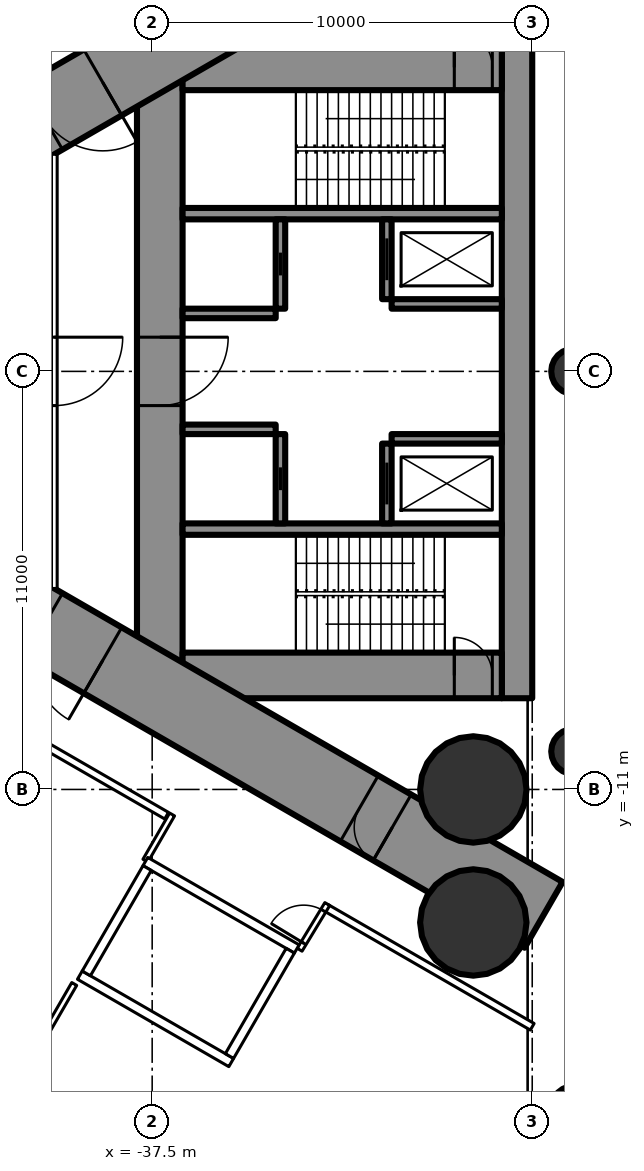
"""IFC4 building model, lengths in metres.
Left out: names, types, materials, properties, quantities, classifications, styles, units other than length and angle.
Written with IfcOpenShell. Run it as: python <this file> out.ifc"""

import sys

from ifc_helpers import new_model, si_unit, direction, frame, frame_2d, origin, origin_2d, place, context, subcontext, project, spatial, rectangle, circle, hollow_circle, extrude, element, fill, save


model = new_model("IFC4")
c1 = context("Model", 3, precision=1e-05, world=origin(), true_north=direction((0.0, 1.0)))
c2 = subcontext(c1, "Body", "Model", "MODEL_VIEW")
j1 = project(units=[si_unit("LENGTHUNIT", "METRE"), si_unit("PLANEANGLEUNIT", "RADIAN")], contexts=[c1])
p1 = place(None, origin())
s1 = spatial("IfcSite", under=j1, at=p1, CompositionType="ELEMENT")
p2 = place(p1, origin())
s2 = spatial("IfcBuilding", under=s1, at=p2, CompositionType="ELEMENT")
p3 = place(p2, frame((0.0, 0.0, 7.2)))
s3 = spatial("IfcBuildingStorey", under=s2, at=p3, CompositionType="ELEMENT", Elevation=7.2)
for number, where, z_axis, x_axis in (
    (1, (-29.05, -11.0, 0.0), (0.0, 0.0, 1.0), (1.0, 0.0, 0.0)),
    (2, (-29.05, -14.5, 0.0), (0.0, 0.0, 1.0), (1.0, 0.0, 0.0)),
):
    element("IfcColumn", number, at=place(p3, frame(where, z_axis=z_axis, x_axis=x_axis)), inside=s3, PredefinedType="COLUMN", context=c2, shape_type="SweptSolid", body=[
        extrude(hollow_circle(Radius=1.4, WallThickness=0.12, at=origin_2d()), origin(), (0.0, 0.0, 1.0), 5.4),
    ])
p4 = place(p3, frame((-27.9, 8.6, 0.0), z_axis=(0.0, 0.0, 1.0), x_axis=(0.0, -1.0, 0.0)))
e3 = element("IfcWall", 3, at=p4, inside=s3, PredefinedType="SHEAR", context=c2, shape_type="SweptSolid", body=[
    extrude(rectangle(XDim=17.2, YDim=0.8, at=frame_2d((8.6, 0.0))), origin(), (0.0, 0.0, 1.0), 5.4),
])
p5 = place(p3, frame((-37.3, 8.6, 0.0), z_axis=(0.0, 0.0, 1.0), x_axis=(0.0, -1.0, 0.0)))
e4 = element("IfcWall", 4, at=p5, inside=s3, PredefinedType="SHEAR", context=c2, shape_type="SweptSolid", body=[
    extrude(rectangle(XDim=17.2, YDim=1.2, at=frame_2d((8.6, 0.0))), origin(), (0.0, 0.0, 1.0), 5.4),
])
p6 = place(p5, frame((7.7, 0.0, 0.0)))
e5 = element("IfcOpeningElement", 5, at=p6, cuts=e4, PredefinedType="OPENING", context=c2, shape_type="SweptSolid", body=[
    extrude(rectangle(XDim=1.8, YDim=2.2, at=frame_2d((0.9, 1.1))), frame((0.0, 0.61, 0.0), z_axis=(0.0, -1.0, 0.0), x_axis=(1.0, 0.0, 0.0)), (0.0, 0.0, 1.0), 1.22),
])
p7 = place(p3, frame((-28.3, 8.0, 0.0), z_axis=(0.0, 0.0, 1.0), x_axis=(-1.0, 0.0, 0.0)))
e6 = element("IfcWall", 6, at=p7, inside=s3, PredefinedType="SHEAR", context=c2, shape_type="SweptSolid", body=[
    extrude(rectangle(XDim=8.4, YDim=1.2, at=frame_2d((4.2, 0.0))), origin(), (0.0, 0.0, 1.0), 5.4),
])
p8 = place(p7, frame((0.25, 0.0, 0.0)))
e7 = element("IfcOpeningElement", 7, at=p8, cuts=e6, PredefinedType="OPENING", context=c2, shape_type="SweptSolid", body=[
    extrude(rectangle(XDim=1.0, YDim=2.2, at=frame_2d((0.5, 1.1))), frame((0.0, 0.61, 0.0), z_axis=(0.0, -1.0, 0.0), x_axis=(1.0, 0.0, 0.0)), (0.0, 0.0, 1.0), 1.22),
])
p9 = place(p3, frame((-28.3, -8.0, 0.0), z_axis=(0.0, 0.0, 1.0), x_axis=(-1.0, 0.0, 0.0)))
e8 = element("IfcWall", 8, at=p9, inside=s3, PredefinedType="SHEAR", context=c2, shape_type="SweptSolid", body=[
    extrude(rectangle(XDim=8.4, YDim=1.2, at=frame_2d((4.2, 0.0))), origin(), (0.0, 0.0, 1.0), 5.4),
])
p10 = place(p9, frame((0.25, 0.0, 0.0)))
e9 = element("IfcOpeningElement", 9, at=p10, cuts=e8, PredefinedType="OPENING", context=c2, shape_type="SweptSolid", body=[
    extrude(rectangle(XDim=1.0, YDim=2.2, at=frame_2d((0.5, 1.1))), frame((0.0, 0.61, 0.0), z_axis=(0.0, -1.0, 0.0), x_axis=(1.0, 0.0, 0.0)), (0.0, 0.0, 1.0), 1.22),
])
for number, where, z_axis, x_axis in (
    (10, (-28.3, 4.15, 0.0), (0.0, 0.0, 1.0), (-1.0, 0.0, 0.0)),
    (11, (-28.3, -4.15, 0.0), (0.0, 0.0, 1.0), (-1.0, 0.0, 0.0)),
):
    element("IfcWall", number, at=place(p3, frame(where, z_axis=z_axis, x_axis=x_axis)), inside=s3, PredefinedType="SHEAR", context=c2, shape_type="SweptSolid", body=[
        extrude(rectangle(XDim=8.4, YDim=0.3, at=frame_2d((4.2, 0.0))), origin(), (0.0, 0.0, 1.0), 5.4),
    ])
p11 = place(p3, frame((-31.325, 4.0, 0.0), z_axis=(0.0, 0.0, 1.0), x_axis=(0.0, -1.0, 0.0)))
e12 = element("IfcWall", 12, at=p11, inside=s3, PredefinedType="SHEAR", context=c2, shape_type="SweptSolid", body=[
    extrude(rectangle(XDim=2.1, YDim=0.25, at=frame_2d((1.05, 0.0))), origin(), (0.0, 0.0, 1.0), 5.4),
])
p12 = place(p11, frame((0.5, 0.0, 0.0)))
e13 = element("IfcOpeningElement", 13, at=p12, cuts=e12, PredefinedType="OPENING", context=c2, shape_type="SweptSolid", body=[
    extrude(rectangle(XDim=1.1, YDim=2.2, at=frame_2d((0.55, 1.1))), frame((0.0, 0.135, 0.0), z_axis=(0.0, -1.0, 0.0), x_axis=(1.0, 0.0, 0.0)), (0.0, 0.0, 1.0), 0.27),
])
p13 = place(p3, frame((-34.125, 4.0, 0.0), z_axis=(0.0, 0.0, 1.0), x_axis=(0.0, -1.0, 0.0)))
e14 = element("IfcWall", 14, at=p13, inside=s3, PredefinedType="SHEAR", context=c2, shape_type="SweptSolid", body=[
    extrude(rectangle(XDim=2.35, YDim=0.25, at=frame_2d((1.175, 0.0))), origin(), (0.0, 0.0, 1.0), 5.4),
])
p14 = place(p13, frame((0.875, 0.0, 0.0)))
e15 = element("IfcOpeningElement", 15, at=p14, cuts=e14, PredefinedType="OPENING", context=c2, shape_type="SweptSolid", body=[
    extrude(rectangle(XDim=0.6, YDim=2.0, at=frame_2d((0.3, 1.0))), frame((0.0, 0.135, 0.0), z_axis=(0.0, -1.0, 0.0), x_axis=(1.0, 0.0, 0.0)), (0.0, 0.0, 1.0), 0.27),
])
p15 = place(p3, frame((-28.3, 1.775, 0.0), z_axis=(0.0, 0.0, 1.0), x_axis=(-1.0, 0.0, 0.0)))
e16 = element("IfcWall", 16, at=p15, inside=s3, PredefinedType="SHEAR", context=c2, shape_type="SweptSolid", body=[
    extrude(rectangle(XDim=2.9, YDim=0.25, at=frame_2d((1.45, 0.0))), origin(), (0.0, 0.0, 1.0), 5.4),
])
p16 = place(p3, frame((-34.25, 1.525, 0.0), z_axis=(0.0, 0.0, 1.0), x_axis=(-1.0, 0.0, 0.0)))
e17 = element("IfcWall", 17, at=p16, inside=s3, PredefinedType="SHEAR", context=c2, shape_type="SweptSolid", body=[
    extrude(rectangle(XDim=2.45, YDim=0.25, at=frame_2d((1.225, 0.0))), origin(), (0.0, 0.0, 1.0), 5.4),
])
p17 = place(p3, frame((-31.325, -1.9, 0.0), z_axis=(0.0, 0.0, 1.0), x_axis=(0.0, -1.0, 0.0)))
e18 = element("IfcWall", 18, at=p17, inside=s3, PredefinedType="SHEAR", context=c2, shape_type="SweptSolid", body=[
    extrude(rectangle(XDim=2.1, YDim=0.25, at=frame_2d((1.05, 0.0))), origin(), (0.0, 0.0, 1.0), 5.4),
])
p18 = place(p17, frame((0.5, 0.0, 0.0)))
e19 = element("IfcOpeningElement", 19, at=p18, cuts=e18, PredefinedType="OPENING", context=c2, shape_type="SweptSolid", body=[
    extrude(rectangle(XDim=1.1, YDim=2.2, at=frame_2d((0.55, 1.1))), frame((0.0, 0.135, 0.0), z_axis=(0.0, -1.0, 0.0), x_axis=(1.0, 0.0, 0.0)), (0.0, 0.0, 1.0), 0.27),
])
p19 = place(p3, frame((-34.125, -1.65, 0.0), z_axis=(0.0, 0.0, 1.0), x_axis=(0.0, -1.0, 0.0)))
e20 = element("IfcWall", 20, at=p19, inside=s3, PredefinedType="SHEAR", context=c2, shape_type="SweptSolid", body=[
    extrude(rectangle(XDim=2.35, YDim=0.25, at=frame_2d((1.175, 0.0))), origin(), (0.0, 0.0, 1.0), 5.4),
])
p20 = place(p19, frame((0.875, 0.0, 0.0)))
e21 = element("IfcOpeningElement", 21, at=p20, cuts=e20, PredefinedType="OPENING", context=c2, shape_type="SweptSolid", body=[
    extrude(rectangle(XDim=0.6, YDim=2.0, at=frame_2d((0.3, 1.0))), frame((0.0, 0.135, 0.0), z_axis=(0.0, -1.0, 0.0), x_axis=(1.0, 0.0, 0.0)), (0.0, 0.0, 1.0), 0.27),
])
p21 = place(p3, frame((-28.3, -1.775, 0.0), z_axis=(0.0, 0.0, 1.0), x_axis=(-1.0, 0.0, 0.0)))
e22 = element("IfcWall", 22, at=p21, inside=s3, PredefinedType="SHEAR", context=c2, shape_type="SweptSolid", body=[
    extrude(rectangle(XDim=2.9, YDim=0.25, at=frame_2d((1.45, 0.0))), origin(), (0.0, 0.0, 1.0), 5.4),
])
p22 = place(p3, frame((-34.25, -1.525, 0.0), z_axis=(0.0, 0.0, 1.0), x_axis=(-1.0, 0.0, 0.0)))
e23 = element("IfcWall", 23, at=p22, inside=s3, PredefinedType="SHEAR", context=c2, shape_type="SweptSolid", body=[
    extrude(rectangle(XDim=2.45, YDim=0.25, at=frame_2d((1.225, 0.0))), origin(), (0.0, 0.0, 1.0), 5.4),
])
p23 = place(p3, frame((-27.2, 14.3, 0.0), z_axis=(0.0, 0.0, 1.0), x_axis=(-0.866026593062, -0.499997940104, 0.0)))
e24 = element("IfcWall", 24, at=p23, inside=s3, PredefinedType="SHEAR", context=c2, shape_type="SweptSolid", body=[
    extrude(rectangle(XDim=28.946, YDim=2.0, at=frame_2d((14.473, 0.0))), origin(), (0.0, 0.0, 1.0), 5.4),
])
p24 = place(p23, frame((4.6, 0.0, 0.0)))
e25 = element("IfcOpeningElement", 25, at=p24, cuts=e24, PredefinedType="OPENING", context=c2, shape_type="SweptSolid", body=[
    extrude(rectangle(XDim=1.0, YDim=2.2, at=frame_2d((0.5, 1.1))), frame((0.0, 1.01, 0.0), z_axis=(0.0, -1.0, 0.0), x_axis=(1.0, 0.0, 0.0)), (0.0, 0.0, 1.0), 2.02),
])
p25 = place(p23, frame((13.395, 0.0, 0.0)))
e26 = element("IfcOpeningElement", 26, at=p25, cuts=e24, PredefinedType="OPENING", context=c2, shape_type="SweptSolid", body=[
    extrude(rectangle(XDim=1.8, YDim=2.2, at=frame_2d((0.9, 1.1))), frame((0.0, 1.01, 0.0), z_axis=(0.0, -1.0, 0.0), x_axis=(1.0, 0.0, 0.0)), (0.0, 0.0, 1.0), 2.02),
])
p26 = place(p3, frame((-27.2, -14.3, 0.0), z_axis=(0.0, 0.0, 1.0), x_axis=(-0.866024044937, 0.500002353585, 0.0)))
e27 = element("IfcWall", 27, at=p26, inside=s3, PredefinedType="SHEAR", context=c2, shape_type="SweptSolid", body=[
    extrude(rectangle(XDim=27.533, YDim=2.0, at=frame_2d((13.767, 0.0))), origin(), (0.0, 0.0, 1.0), 5.4),
])
p27 = place(p26, frame((4.6, 0.0, 0.0)))
e28 = element("IfcOpeningElement", 28, at=p27, cuts=e27, PredefinedType="OPENING", context=c2, shape_type="SweptSolid", body=[
    extrude(rectangle(XDim=1.0, YDim=2.2, at=frame_2d((0.5, 1.1))), frame((0.0, 1.01, 0.0), z_axis=(0.0, -1.0, 0.0), x_axis=(1.0, 0.0, 0.0)), (0.0, 0.0, 1.0), 2.02),
])
p28 = place(p26, frame((13.395, 0.0, 0.0)))
e29 = element("IfcOpeningElement", 29, at=p28, cuts=e27, PredefinedType="OPENING", context=c2, shape_type="SweptSolid", body=[
    extrude(rectangle(XDim=1.8, YDim=2.2, at=frame_2d((0.9, 1.1))), frame((0.0, 1.01, 0.0), z_axis=(0.0, -1.0, 0.0), x_axis=(1.0, 0.0, 0.0)), (0.0, 0.0, 1.0), 2.02),
])
for number, where, z_axis, x_axis in (
    (30, (-26.4, -19.4, 0.0), (0.0, 0.0, 1.0), (1.0, 0.0, 0.0)),
    (31, (-26.4, -10.0, 0.0), (0.0, 0.0, 1.0), (1.0, 0.0, 0.0)),
    (32, (-26.4, 0.0, 0.0), (0.0, 0.0, 1.0), (1.0, 0.0, 0.0)),
):
    element("IfcColumn", number, at=place(p3, frame(where, z_axis=z_axis, x_axis=x_axis)), inside=s3, PredefinedType="COLUMN", context=c2, shape_type="SweptSolid", body=[
        extrude(circle(Radius=0.6, at=origin_2d()), origin(), (0.0, 0.0, 1.0), 5.4),
    ])
p29 = place(p3, frame((-39.551, -16.118, 0.0), z_axis=(0.0, 0.0, 1.0), x_axis=(-0.499986503906, -0.866033195618, 0.0)))
e33 = element("IfcWall", 33, at=p29, inside=s3, PredefinedType="PARTITIONING", context=c2, shape_type="SweptSolid", body=[
    extrude(rectangle(XDim=3.815, YDim=0.15, at=frame_2d((1.907, 0.0))), origin(), (0.0, 0.0, 1.0), 5.05),
])
p30 = place(p3, frame((-37.9, 11.24, 0.0), z_axis=(0.0, 0.0, 1.0), x_axis=(-0.866022995118, -0.50000417191, 0.0)))
e34 = element("IfcWall", 34, at=p30, inside=s3, PredefinedType="PARTITIONING", context=c2, shape_type="SweptSolid", body=[
    extrude(rectangle(XDim=22.48, YDim=0.2, at=frame_2d((11.24, 0.0))), origin(), (0.0, 0.0, 1.0), 5.05),
])
p31 = place(p30, frame((14.644, 0.0, 0.0)))
e35 = element("IfcOpeningElement", 35, at=p31, cuts=e34, PredefinedType="OPENING", context=c2, shape_type="SweptSolid", body=[
    extrude(rectangle(XDim=1.8, YDim=2.2, at=frame_2d((0.9, 1.1))), frame((0.0, 0.11, 0.0), z_axis=(0.0, -1.0, 0.0), x_axis=(1.0, 0.0, 0.0)), (0.0, 0.0, 1.0), 0.22),
])
p32 = place(p30, frame((20.069, 0.0, 0.0)))
e36 = element("IfcOpeningElement", 36, at=p32, cuts=e34, PredefinedType="OPENING", context=c2, shape_type="SweptSolid", body=[
    extrude(rectangle(XDim=1.8, YDim=2.2, at=frame_2d((0.9, 1.1))), frame((0.0, 0.11, 0.0), z_axis=(0.0, -1.0, 0.0), x_axis=(1.0, 0.0, 0.0)), (0.0, 0.0, 1.0), 0.22),
])
p33 = place(p30, frame((4.915, 0.0, 0.0)))
e37 = element("IfcOpeningElement", 37, at=p33, cuts=e34, PredefinedType="OPENING", context=c2, shape_type="SweptSolid", body=[
    extrude(rectangle(XDim=1.8, YDim=2.2, at=frame_2d((0.9, 1.1))), frame((0.0, 0.11, 0.0), z_axis=(0.0, -1.0, 0.0), x_axis=(1.0, 0.0, 0.0)), (0.0, 0.0, 1.0), 0.22),
])
p34 = place(p3, frame((-27.5, -17.244, 0.0), z_axis=(0.0, 0.0, 1.0), x_axis=(-0.866027347857, 0.499996632752, 0.0)))
e38 = element("IfcWall", 38, at=p34, inside=s3, PredefinedType="PARTITIONING", context=c2, shape_type="SweptSolid", body=[
    extrude(rectangle(XDim=6.269, YDim=0.2, at=frame_2d((3.135, 0.0))), origin(), (0.0, 0.0, 1.0), 5.05),
])
p35 = place(p3, frame((-37.12, -11.69, 0.0), z_axis=(0.0, 0.0, 1.0), x_axis=(-0.866028803602, 0.499994111297, 0.0)))
e39 = element("IfcWall", 39, at=p35, inside=s3, PredefinedType="PARTITIONING", context=c2, shape_type="SweptSolid", body=[
    extrude(rectangle(XDim=23.26, YDim=0.2, at=frame_2d((11.63, 0.0))), origin(), (0.0, 0.0, 1.0), 5.05),
])
p36 = place(p35, frame((20.909, 0.0, 0.0)))
e40 = element("IfcOpeningElement", 40, at=p36, cuts=e39, PredefinedType="OPENING", context=c2, shape_type="SweptSolid", body=[
    extrude(rectangle(XDim=1.8, YDim=2.2, at=frame_2d((0.9, 1.1))), frame((0.0, 0.11, 0.0), z_axis=(0.0, -1.0, 0.0), x_axis=(1.0, 0.0, 0.0)), (0.0, 0.0, 1.0), 0.22),
])
p37 = place(p35, frame((15.544, 0.0, 0.0)))
e41 = element("IfcOpeningElement", 41, at=p37, cuts=e39, PredefinedType="OPENING", context=c2, shape_type="SweptSolid", body=[
    extrude(rectangle(XDim=1.8, YDim=2.2, at=frame_2d((0.9, 1.1))), frame((0.0, 0.11, 0.0), z_axis=(0.0, -1.0, 0.0), x_axis=(1.0, 0.0, 0.0)), (0.0, 0.0, 1.0), 0.22),
])
p38 = place(p35, frame((5.365, 0.0, 0.0)))
e42 = element("IfcOpeningElement", 42, at=p38, cuts=e39, PredefinedType="OPENING", context=c2, shape_type="SweptSolid", body=[
    extrude(rectangle(XDim=1.8, YDim=2.2, at=frame_2d((0.9, 1.1))), frame((0.0, 0.11, 0.0), z_axis=(0.0, -1.0, 0.0), x_axis=(1.0, 0.0, 0.0)), (0.0, 0.0, 1.0), 0.22),
])
p39 = place(p3, frame((-36.976, -11.658, 0.0), z_axis=(0.0, 0.0, 1.0), x_axis=(-0.50008355685, -0.86597715684, 0.0)))
e43 = element("IfcWall", 43, at=p39, inside=s3, PredefinedType="PARTITIONING", context=c2, shape_type="SweptSolid", body=[
    extrude(rectangle(XDim=1.405, YDim=0.15, at=frame_2d((0.702, 0.0))), origin(), (0.0, 0.0, 1.0), 5.05),
])
p40 = place(p3, frame((-33.621, -15.218, 0.0), z_axis=(0.0, 0.0, 1.0), x_axis=(0.518424923641, 0.855123148177, 0.0)))
e44 = element("IfcWall", 44, at=p40, inside=s3, PredefinedType="PARTITIONING", context=c2, shape_type="SweptSolid", body=[
    extrude(rectangle(XDim=1.405, YDim=0.15, at=frame_2d((0.703, 0.0))), origin(), (0.0, 0.0, 1.0), 5.05),
])
p41 = place(p40, frame((0.203, 0.0, 0.0)))
e45 = element("IfcOpeningElement", 45, at=p41, cuts=e44, PredefinedType="OPENING", context=c2, shape_type="SweptSolid", body=[
    extrude(rectangle(XDim=1.0, YDim=2.2, at=frame_2d((0.5, 1.1))), frame((0.0, 0.085, 0.0), z_axis=(0.0, -1.0, 0.0), x_axis=(1.0, 0.0, 0.0)), (0.0, 0.0, 1.0), 0.17),
])
p42 = place(p3, frame((-40.075, 5.712, 0.0), z_axis=(0.0, 0.0, 1.0), x_axis=(0.0, -1.0, 0.0)))
e46 = element("IfcWall", 46, at=p42, inside=s3, PredefinedType="PARTITIONING", context=c2, shape_type="SweptSolid", body=[
    extrude(rectangle(XDim=11.424, YDim=0.15, at=frame_2d((5.712, 0.0))), origin(), (0.0, 0.0, 1.0), 5.05),
])
p43 = place(p42, frame((4.812, 0.0, 0.0)))
e47 = element("IfcOpeningElement", 47, at=p43, cuts=e46, PredefinedType="OPENING", context=c2, shape_type="SweptSolid", body=[
    extrude(rectangle(XDim=1.8, YDim=2.2, at=frame_2d((0.9, 1.1))), frame((0.0, 0.085, 0.0), z_axis=(0.0, -1.0, 0.0), x_axis=(1.0, 0.0, 0.0)), (0.0, 0.0, 1.0), 0.17),
])
p44 = place(p3, frame((-33.696, -15.197, 0.0), z_axis=(0.0, 0.0, 1.0), x_axis=(-0.865976953817, 0.500083908417, 0.0)))
e48 = element("IfcWall", 48, at=p44, inside=s3, PredefinedType="PARTITIONING", context=c2, shape_type="SweptSolid", body=[
    extrude(rectangle(XDim=4.599, YDim=0.25, at=frame_2d((2.3, 0.0))), origin(), (0.0, 0.0, 1.0), 5.05),
])
p45 = place(p3, frame((-35.42, -18.186, 0.0), z_axis=(0.0, 0.0, 1.0), x_axis=(-0.865990227814, 0.50006092162, 0.0)))
e49 = element("IfcWall", 49, at=p45, inside=s3, PredefinedType="PARTITIONING", context=c2, shape_type="SweptSolid", body=[
    extrude(rectangle(XDim=4.6, YDim=0.25, at=frame_2d((2.3, 0.0))), origin(), (0.0, 0.0, 1.0), 5.05),
])
p46 = place(p3, frame((-33.866, -15.243, 0.0), z_axis=(0.0, 0.0, 1.0), x_axis=(-0.499929347863, -0.866066190972, 0.0)))
e50 = element("IfcWall", 50, at=p46, inside=s3, PredefinedType="PARTITIONING", context=c2, shape_type="SweptSolid", body=[
    extrude(rectangle(XDim=3.201, YDim=0.25, at=frame_2d((1.6, 0.0))), origin(), (0.0, 0.0, 1.0), 5.05),
])
p47 = place(p3, frame((-37.633, -13.068, 0.0), z_axis=(0.0, 0.0, 1.0), x_axis=(-0.499872130319, -0.866099216793, 0.0)))
e51 = element("IfcWall", 51, at=p47, inside=s3, PredefinedType="PARTITIONING", context=c2, shape_type="SweptSolid", body=[
    extrude(rectangle(XDim=3.2, YDim=0.25, at=frame_2d((1.6, 0.0))), origin(), (0.0, 0.0, 1.0), 5.05),
])
p48 = place(p41, origin())
e52 = element("IfcDoor", 52, at=p48, inside=s3, OperationType="SINGLE_SWING_LEFT", PredefinedType="DOOR", context=c2, shape_type="SweptSolid", body=[
    extrude(rectangle(XDim=1.0, YDim=2.2, at=frame_2d((0.5, 1.1))), frame((0.0, 0.025, 0.0), z_axis=(0.0, -1.0, 0.0), x_axis=(1.0, 0.0, 0.0)), (0.0, 0.0, 1.0), 0.05),
])
fill(e45, e52)
p49 = place(p43, origin())
e53 = element("IfcDoor", 53, at=p49, inside=s3, OperationType="DOUBLE_DOOR_SINGLE_SWING", PredefinedType="DOOR", context=c2, shape_type="SweptSolid", body=[
    extrude(rectangle(XDim=1.8, YDim=2.2, at=frame_2d((0.9, 1.1))), frame((0.0, 0.025, 0.0), z_axis=(0.0, -1.0, 0.0), x_axis=(1.0, 0.0, 0.0)), (0.0, 0.0, 1.0), 0.05),
])
fill(e47, e53)
p50 = place(p25, origin())
e54 = element("IfcDoor", 54, at=p50, inside=s3, OperationType="DOUBLE_DOOR_SINGLE_SWING", PredefinedType="DOOR", context=c2, shape_type="SweptSolid", body=[
    extrude(rectangle(XDim=1.8, YDim=2.2, at=frame_2d((0.9, 1.1))), frame((0.0, 0.025, 0.0), z_axis=(0.0, -1.0, 0.0), x_axis=(1.0, 0.0, 0.0)), (0.0, 0.0, 1.0), 0.05),
])
fill(e26, e54)
p51 = place(p27, origin())
e55 = element("IfcDoor", 55, at=p51, inside=s3, OperationType="SINGLE_SWING_LEFT", PredefinedType="DOOR", context=c2, shape_type="SweptSolid", body=[
    extrude(rectangle(XDim=1.0, YDim=2.2, at=frame_2d((0.5, 1.1))), frame((0.0, 0.025, 0.0), z_axis=(0.0, -1.0, 0.0), x_axis=(1.0, 0.0, 0.0)), (0.0, 0.0, 1.0), 0.05),
])
fill(e28, e55)
p52 = place(p28, origin())
e56 = element("IfcDoor", 56, at=p52, inside=s3, OperationType="DOUBLE_DOOR_SINGLE_SWING", PredefinedType="DOOR", context=c2, shape_type="SweptSolid", body=[
    extrude(rectangle(XDim=1.8, YDim=2.2, at=frame_2d((0.9, 1.1))), frame((0.0, 0.025, 0.0), z_axis=(0.0, -1.0, 0.0), x_axis=(1.0, 0.0, 0.0)), (0.0, 0.0, 1.0), 0.05),
])
fill(e29, e56)
p53 = place(p6, origin())
e57 = element("IfcDoor", 57, at=p53, inside=s3, OperationType="DOUBLE_DOOR_SINGLE_SWING", PredefinedType="DOOR", context=c2, shape_type="SweptSolid", body=[
    extrude(rectangle(XDim=1.8, YDim=2.2, at=frame_2d((0.9, 1.1))), frame((0.0, 0.025, 0.0), z_axis=(0.0, -1.0, 0.0), x_axis=(1.0, 0.0, 0.0)), (0.0, 0.0, 1.0), 0.05),
])
fill(e5, e57)
p54 = place(p8, origin())
e58 = element("IfcDoor", 58, at=p54, inside=s3, OperationType="SINGLE_SWING_RIGHT", PredefinedType="DOOR", context=c2, shape_type="SweptSolid", body=[
    extrude(rectangle(XDim=1.0, YDim=2.2, at=frame_2d((0.5, 1.1))), frame((0.0, 0.025, 0.0), z_axis=(0.0, -1.0, 0.0), x_axis=(1.0, 0.0, 0.0)), (0.0, 0.0, 1.0), 0.05),
])
fill(e7, e58)
p55 = place(p10, origin())
e59 = element("IfcDoor", 59, at=p55, inside=s3, OperationType="SINGLE_SWING_RIGHT", PredefinedType="DOOR", context=c2, shape_type="SweptSolid", body=[
    extrude(rectangle(XDim=1.0, YDim=2.2, at=frame_2d((0.5, 1.1))), frame((0.0, 0.025, 0.0), z_axis=(0.0, -1.0, 0.0), x_axis=(1.0, 0.0, 0.0)), (0.0, 0.0, 1.0), 0.05),
])
fill(e9, e59)
p56 = place(p12, origin())
e60 = element("IfcDoor", 60, at=p56, inside=s3, OperationType="SLIDING_TO_LEFT", PredefinedType="USERDEFINED", context=c2, shape_type="SweptSolid", body=[
    extrude(rectangle(XDim=1.1, YDim=2.2, at=frame_2d((0.55, 1.1))), frame((0.0, 0.025, 0.0), z_axis=(0.0, -1.0, 0.0), x_axis=(1.0, 0.0, 0.0)), (0.0, 0.0, 1.0), 0.05),
])
fill(e13, e60)
p57 = place(p18, origin())
e61 = element("IfcDoor", 61, at=p57, inside=s3, OperationType="SLIDING_TO_LEFT", PredefinedType="USERDEFINED", context=c2, shape_type="SweptSolid", body=[
    extrude(rectangle(XDim=1.1, YDim=2.2, at=frame_2d((0.55, 1.1))), frame((0.0, 0.025, 0.0), z_axis=(0.0, -1.0, 0.0), x_axis=(1.0, 0.0, 0.0)), (0.0, 0.0, 1.0), 0.05),
])
fill(e19, e61)
p58 = place(p14, origin())
e62 = element("IfcDoor", 62, at=p58, inside=s3, OperationType="SLIDING_TO_LEFT", PredefinedType="DOOR", context=c2, shape_type="SweptSolid", body=[
    extrude(rectangle(XDim=0.6, YDim=2.0, at=frame_2d((0.3, 1.0))), frame((0.0, 0.025, 0.0), z_axis=(0.0, -1.0, 0.0), x_axis=(1.0, 0.0, 0.0)), (0.0, 0.0, 1.0), 0.05),
])
fill(e15, e62)
p59 = place(p20, origin())
e63 = element("IfcDoor", 63, at=p59, inside=s3, OperationType="SLIDING_TO_LEFT", PredefinedType="DOOR", context=c2, shape_type="SweptSolid", body=[
    extrude(rectangle(XDim=0.6, YDim=2.0, at=frame_2d((0.3, 1.0))), frame((0.0, 0.025, 0.0), z_axis=(0.0, -1.0, 0.0), x_axis=(1.0, 0.0, 0.0)), (0.0, 0.0, 1.0), 0.05),
])
fill(e21, e63)
save(model, sys.argv[1])
